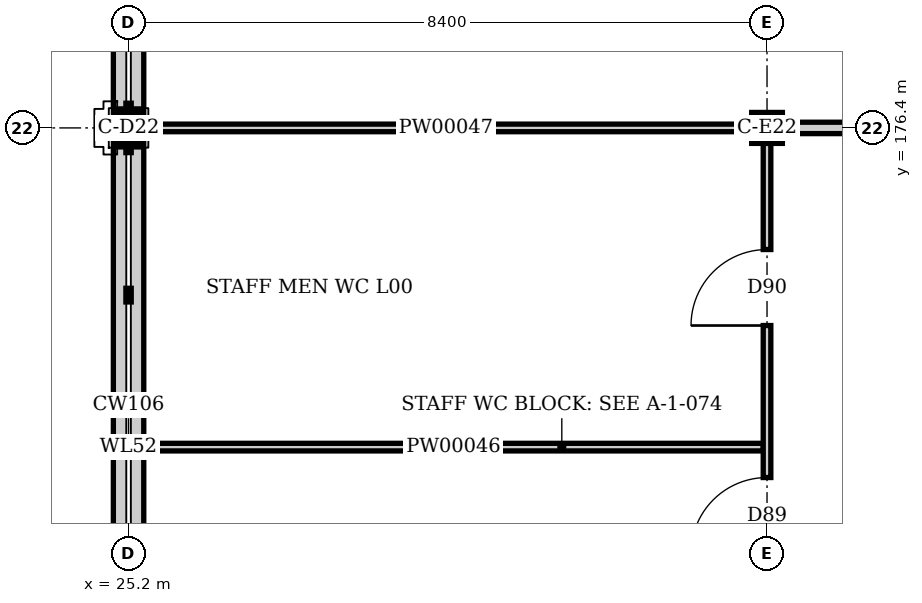
"""IFC4 building model, lengths in metres.
Left out: names, types, materials, properties, quantities, classifications, styles, units other than length and angle.
Written with IfcOpenShell. Run it as: python <this file> out.ifc"""

import sys

from ifc_helpers import new_model, si_unit, direction, frame, frame_2d, origin, origin_2d, place, context, subcontext, project, spatial, rectangle, i_section, extrude, element, fill, save


model = new_model("IFC4")
c1 = context("Model", 3, precision=1e-05, world=origin(), true_north=direction((0.0, 1.0)))
c2 = subcontext(c1, "Body", "Model", "MODEL_VIEW")
j1 = project(units=[si_unit("LENGTHUNIT", "METRE"), si_unit("PLANEANGLEUNIT", "RADIAN")], contexts=[c1])
p1 = place(None, origin())
s1 = spatial("IfcSite", under=j1, at=p1, CompositionType="ELEMENT")
p2 = place(p1, origin())
s2 = spatial("IfcBuilding", under=s1, at=p2, CompositionType="ELEMENT")
p3 = place(p2, origin())
s3 = spatial("IfcBuildingStorey", under=s2, at=p3, CompositionType="ELEMENT", Elevation=0.0)
p4 = place(p3, frame((25.2, 176.4, -0.7), z_axis=(0.0, 0.0, 1.0), x_axis=(1.0, 0.0, 0.0)))
e1 = element("IfcColumn", 1, at=p4, inside=s3, PredefinedType="COLUMN", context=c2, shape_type="SweptSolid", body=[
    extrude(i_section(OverallWidth=0.3, OverallDepth=0.5, WebThickness=0.014, FlangeThickness=0.028, at=origin_2d()), origin(), (0.0, 0.0, 1.0), 6.7),
])
p5 = place(p3, frame((33.6, 176.4, -0.7), z_axis=(0.0, 0.0, 1.0), x_axis=(1.0, 0.0, 0.0)))
e2 = element("IfcColumn", 2, at=p5, inside=s3, PredefinedType="COLUMN", context=c2, shape_type="SweptSolid", body=[
    extrude(i_section(OverallWidth=0.404, OverallDepth=0.407, WebThickness=0.027, FlangeThickness=0.044, at=origin_2d()), origin(), (0.0, 0.0, 1.0), 6.7),
])
p6 = place(p3, frame((25.2, 168.2, 0.0), z_axis=(0.0, 0.0, 1.0), x_axis=(0.0, 1.0, 0.0)))
e3 = element("IfcWall", 3, at=p6, inside=s3, PredefinedType="SOLIDWALL", context=c2, shape_type="SweptSolid", body=[
    extrude(rectangle(XDim=8.0, YDim=0.4, at=frame_2d((4.0, 0.0))), origin(), (0.0, 0.0, 1.0), 1.2),
])
p7 = place(p3, frame((25.2, 176.6, 0.0), z_axis=(0.0, 0.0, 1.0), x_axis=(0.0, 1.0, 0.0)))
e4 = element("IfcWall", 4, at=p7, inside=s3, PredefinedType="SOLIDWALL", context=c2, shape_type="SweptSolid", body=[
    extrude(rectangle(XDim=2.5, YDim=0.4, at=frame_2d((1.25, 0.0))), origin(), (0.0, 0.0, 1.0), 1.2),
])
p8 = place(p3, frame((25.4, 172.2, 0.0), z_axis=(0.0, 0.0, 1.0), x_axis=(1.0, 0.0, 0.0)))
e5 = element("IfcWall", 5, at=p8, inside=s3, PredefinedType="PARTITIONING", context=c2, shape_type="SweptSolid", body=[
    extrude(rectangle(XDim=8.15, YDim=0.1, at=frame_2d((4.075, 0.0))), origin(), (0.0, 0.0, 1.0), 5.8),
])
p9 = place(p3, frame((25.35, 176.4, 0.0), z_axis=(0.0, 0.0, 1.0), x_axis=(1.0, 0.0, 0.0)))
e6 = element("IfcWall", 6, at=p9, inside=s3, PredefinedType="PARTITIONING", context=c2, shape_type="SweptSolid", body=[
    extrude(rectangle(XDim=8.048, YDim=0.1, at=frame_2d((4.024, 0.0))), origin(), (0.0, 0.0, 1.0), 5.272),
])
p10 = place(p3, frame((33.802, 176.4, 0.0), z_axis=(0.0, 0.0, 1.0), x_axis=(1.0, 0.0, 0.0)))
e7 = element("IfcWall", 7, at=p10, inside=s3, PredefinedType="PARTITIONING", context=c2, shape_type="SweptSolid", body=[
    extrude(rectangle(XDim=2.873, YDim=0.15, at=frame_2d((1.437, 0.0))), origin(), (0.0, 0.0, 1.0), 5.272),
])
p11 = place(p3, frame((33.6, 168.0, 0.0), z_axis=(0.0, 0.0, 1.0), x_axis=(0.0, 1.0, 0.0)))
e8 = element("IfcWall", 8, at=p11, inside=s3, PredefinedType="PARTITIONING", context=c2, shape_type="SweptSolid", body=[
    extrude(rectangle(XDim=8.197, YDim=0.1, at=frame_2d((4.098, 0.0))), origin(), (0.0, 0.0, 1.0), 5.272),
])
p12 = place(p11, frame((2.8, 0.0, 0.0)))
e9 = element("IfcOpeningElement", 9, at=p12, cuts=e8, PredefinedType="OPENING", context=c2, shape_type="SweptSolid", body=[
    extrude(rectangle(XDim=1.0, YDim=2.1, at=frame_2d((0.5, 1.05))), frame((0.0, 0.06, 0.0), z_axis=(0.0, -1.0, 0.0), x_axis=(1.0, 0.0, 0.0)), (0.0, 0.0, 1.0), 0.12),
])
p13 = place(p11, frame((5.8, 0.0, 0.0)))
e10 = element("IfcOpeningElement", 10, at=p13, cuts=e8, PredefinedType="OPENING", context=c2, shape_type="SweptSolid", body=[
    extrude(rectangle(XDim=1.0, YDim=2.1, at=frame_2d((0.5, 1.05))), frame((0.0, 0.06, 0.0), z_axis=(0.0, -1.0, 0.0), x_axis=(1.0, 0.0, 0.0)), (0.0, 0.0, 1.0), 0.12),
])
p14 = place(p12, origin())
e11 = element("IfcDoor", 11, at=p14, inside=s3, OperationType="SINGLE_SWING_LEFT", PredefinedType="DOOR", context=c2, shape_type="SweptSolid", body=[
    extrude(rectangle(XDim=1.0, YDim=2.1, at=frame_2d((0.5, 1.05))), frame((0.0, 0.025, 0.0), z_axis=(0.0, -1.0, 0.0), x_axis=(1.0, 0.0, 0.0)), (0.0, 0.0, 1.0), 0.05),
])
fill(e9, e11)
p15 = place(p13, origin())
e12 = element("IfcDoor", 12, at=p15, inside=s3, OperationType="SINGLE_SWING_LEFT", PredefinedType="DOOR", context=c2, shape_type="SweptSolid", body=[
    extrude(rectangle(XDim=1.0, YDim=2.1, at=frame_2d((0.5, 1.05))), frame((0.0, 0.025, 0.0), z_axis=(0.0, -1.0, 0.0), x_axis=(1.0, 0.0, 0.0)), (0.0, 0.0, 1.0), 0.05),
])
fill(e10, e12)
save(model, sys.argv[1])
